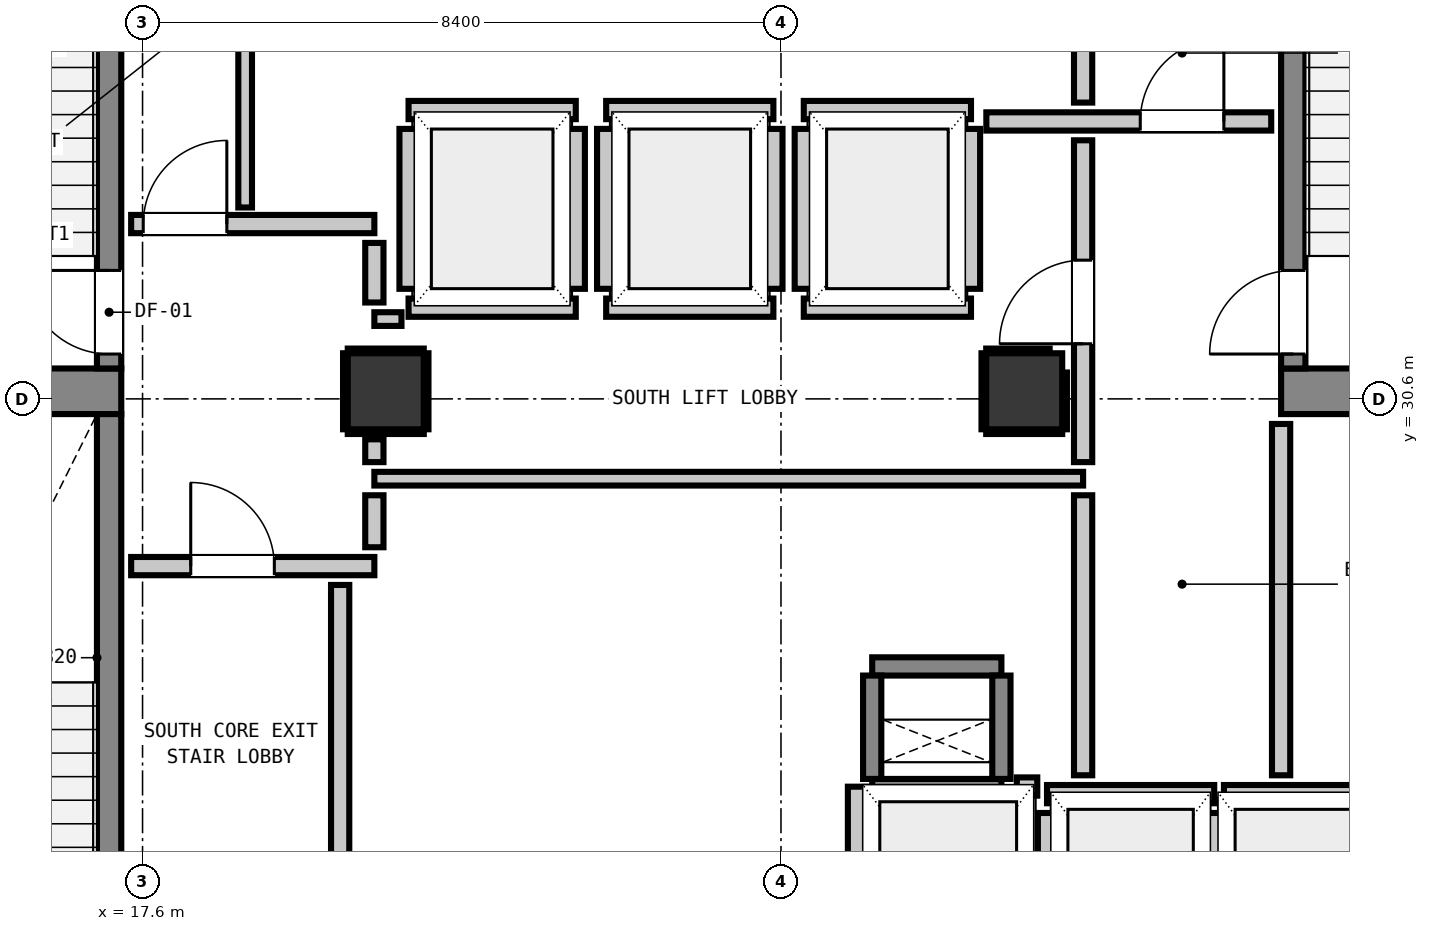
"""IFC4 building model, lengths in metres.
Left out: names, types, materials, properties, quantities, classifications, styles, units other than length and angle.
Written with IfcOpenShell. Run it as: python <this file> out.ifc"""

import sys

from ifc_helpers import new_model, si_unit, direction, frame, frame_2d, origin, origin_2d, place, context, subcontext, project, spatial, rectangle, extrude, element, fill, save


model = new_model("IFC4")
c1 = context("Model", 3, precision=1e-05, world=origin(), true_north=direction((0.0, 1.0)))
c2 = subcontext(c1, "Body", "Model", "MODEL_VIEW")
j1 = project(units=[si_unit("LENGTHUNIT", "METRE"), si_unit("PLANEANGLEUNIT", "RADIAN")], contexts=[c1])
p1 = place(None, origin())
s1 = spatial("IfcSite", under=j1, at=p1, CompositionType="ELEMENT")
p2 = place(p1, origin())
s2 = spatial("IfcBuilding", under=s1, at=p2, CompositionType="ELEMENT")
p3 = place(p2, frame((0.0, 0.0, 152.56)))
s3 = spatial("IfcBuildingStorey", under=s2, at=p3, CompositionType="ELEMENT", Elevation=152.56)
for number, where, z_axis, x_axis in (
    (1, (13.905, 30.7, 0.0), (0.0, 0.0, 1.0), (1.0, 0.0, 0.0)),
    (2, (32.58, 30.7, 0.0), (0.0, 0.0, 1.0), (1.0, 0.0, 0.0)),
):
    element("IfcWall", number, at=place(p3, frame(where, z_axis=z_axis, x_axis=x_axis)), inside=s3, PredefinedType="SHEAR", context=c2, shape_type="SweptSolid", body=[
        extrude(rectangle(XDim=3.415, YDim=0.6, at=frame_2d((1.708, 0.0))), origin(), (0.0, 0.0, 1.0), 3.32),
    ])
p4 = place(p3, frame((17.16, 31.0, 0.0), z_axis=(0.0, 0.0, 1.0), x_axis=(0.0, 1.0, 0.0)))
e3 = element("IfcWall", 3, at=p4, inside=s3, PredefinedType="SHEAR", context=c2, shape_type="SweptSolid", body=[
    extrude(rectangle(XDim=7.8, YDim=0.32, at=frame_2d((3.9, 0.0))), origin(), (0.0, 0.0, 1.0), 3.32),
])
p5 = place(p4, frame((0.19, 0.0, 0.0)))
e4 = element("IfcOpeningElement", 4, at=p5, cuts=e3, PredefinedType="OPENING", context=c2, shape_type="SweptSolid", body=[
    extrude(rectangle(XDim=1.1, YDim=2.15, at=frame_2d((0.55, 1.075))), frame((0.0, 0.17, 0.0), z_axis=(0.0, -1.0, 0.0), x_axis=(1.0, 0.0, 0.0)), (0.0, 0.0, 1.0), 0.34),
])
p6 = place(p3, frame((17.16, 22.5, 0.0), z_axis=(0.0, 0.0, 1.0), x_axis=(0.0, 1.0, 0.0)))
e5 = element("IfcWall", 5, at=p6, inside=s3, PredefinedType="SHEAR", context=c2, shape_type="SweptSolid", body=[
    extrude(rectangle(XDim=7.9, YDim=0.32, at=frame_2d((3.95, 0.0))), origin(), (0.0, 0.0, 1.0), 3.32),
])
p7 = place(p6, frame((0.29, 0.0, 0.0)))
e6 = element("IfcOpeningElement", 6, at=p7, cuts=e5, PredefinedType="OPENING", context=c2, shape_type="SweptSolid", body=[
    extrude(rectangle(XDim=1.1, YDim=2.15, at=frame_2d((0.55, 1.075))), frame((0.0, 0.17, 0.0), z_axis=(0.0, -1.0, 0.0), x_axis=(1.0, 0.0, 0.0)), (0.0, 0.0, 1.0), 0.34),
])
p8 = place(p3, frame((32.74, 31.0, 0.0), z_axis=(0.0, 0.0, 1.0), x_axis=(0.0, 1.0, 0.0)))
e7 = element("IfcWall", 7, at=p8, inside=s3, PredefinedType="SHEAR", context=c2, shape_type="SweptSolid", body=[
    extrude(rectangle(XDim=7.8, YDim=0.32, at=frame_2d((3.9, 0.0))), origin(), (0.0, 0.0, 1.0), 3.32),
])
p9 = place(p8, frame((0.19, 0.0, 0.0)))
e8 = element("IfcOpeningElement", 8, at=p9, cuts=e7, PredefinedType="OPENING", context=c2, shape_type="SweptSolid", body=[
    extrude(rectangle(XDim=1.1, YDim=2.15, at=frame_2d((0.55, 1.075))), frame((0.0, 0.17, 0.0), z_axis=(0.0, -1.0, 0.0), x_axis=(1.0, 0.0, 0.0)), (0.0, 0.0, 1.0), 0.34),
])
for number, where, z_axis, x_axis in (
    (9, (27.2, 25.48, 0.0), (0.0, 0.0, 1.0), (1.0, 0.0, 0.0)),
    (10, (27.2, 27.08, 0.0), (0.0, 0.0, 1.0), (1.0, 0.0, 0.0)),
):
    element("IfcWall", number, at=place(p3, frame(where, z_axis=z_axis, x_axis=x_axis)), inside=s3, PredefinedType="SHEAR", context=c2, shape_type="SweptSolid", body=[
        extrude(rectangle(XDim=1.7, YDim=0.24, at=frame_2d((0.85, 0.0))), origin(), (0.0, 0.0, 1.0), 3.32),
    ])
for number, where, z_axis, x_axis in (
    (11, (27.2, 25.6, 0.0), (0.0, 0.0, 1.0), (0.0, 1.0, 0.0)),
    (12, (28.9, 25.6, 0.0), (0.0, 0.0, 1.0), (0.0, 1.0, 0.0)),
):
    element("IfcWall", number, at=place(p3, frame(where, z_axis=z_axis, x_axis=x_axis)), inside=s3, PredefinedType="SHEAR", context=c2, shape_type="SweptSolid", body=[
        extrude(rectangle(XDim=1.36, YDim=0.24, at=frame_2d((0.68, 0.0))), origin(), (0.0, 0.0, 1.0), 3.32),
    ])
for number, where, z_axis, x_axis in (
    (13, (20.8, 30.7, 0.0), (0.0, 0.0, 1.0), (1.0, 0.0, 0.0)),
    (14, (29.2, 30.7, 0.0), (0.0, 0.0, 1.0), (1.0, 0.0, 0.0)),
):
    element("IfcColumn", number, at=place(p3, frame(where, z_axis=z_axis, x_axis=x_axis)), inside=s3, PredefinedType="COLUMN", context=c2, shape_type="SweptSolid", body=[
        extrude(rectangle(XDim=1.0, YDim=1.0, at=origin_2d()), origin(), (0.0, 0.0, 1.0), 3.32),
    ])
for number, where, z_axis, x_axis in (
    (15, (21.1, 31.8, 0.0), (0.0, 0.0, 1.0), (1.0, 0.0, 0.0)),
    (16, (21.1, 34.4, 0.0), (0.0, 0.0, 1.0), (1.0, 0.0, 0.0)),
):
    element("IfcWall", number, at=place(p3, frame(where, z_axis=z_axis, x_axis=x_axis)), inside=s3, PredefinedType="PARTITIONING", context=c2, shape_type="SweptSolid", body=[
        extrude(rectangle(XDim=2.2, YDim=0.24, at=frame_2d((1.1, 0.0))), origin(), (0.0, 0.0, 1.0), 3.08),
    ])
p10 = place(p3, frame((21.1, 32.048, 0.0), z_axis=(0.0, 0.0, 1.0), x_axis=(0.0, 1.0, 0.0)))
e17 = element("IfcWall", 17, at=p10, inside=s3, PredefinedType="PARTITIONING", context=c2, shape_type="SweptSolid", body=[
    extrude(rectangle(XDim=2.104, YDim=0.24, at=frame_2d((1.052, 0.0))), origin(), (0.0, 0.0, 1.0), 2.315),
])
p11 = place(p3, frame((23.3, 32.048, 0.0), z_axis=(0.0, 0.0, 1.0), x_axis=(0.0, 1.0, 0.0)))
e18 = element("IfcWall", 18, at=p11, inside=s3, PredefinedType="PARTITIONING", context=c2, shape_type="SweptSolid", body=[
    extrude(rectangle(XDim=2.104, YDim=0.24, at=frame_2d((1.052, 0.0))), origin(), (0.0, 0.0, 1.0), 3.08),
])
for number, where, z_axis, x_axis in (
    (19, (23.7, 31.8, 0.0), (0.0, 0.0, 1.0), (1.0, 0.0, 0.0)),
    (20, (23.7, 34.4, 0.0), (0.0, 0.0, 1.0), (1.0, 0.0, 0.0)),
):
    element("IfcWall", number, at=place(p3, frame(where, z_axis=z_axis, x_axis=x_axis)), inside=s3, PredefinedType="PARTITIONING", context=c2, shape_type="SweptSolid", body=[
        extrude(rectangle(XDim=2.2, YDim=0.24, at=frame_2d((1.1, 0.0))), origin(), (0.0, 0.0, 1.0), 3.08),
    ])
for number, where, z_axis, x_axis in (
    (21, (23.7, 32.048, 0.0), (0.0, 0.0, 1.0), (0.0, 1.0, 0.0)),
    (22, (25.9, 32.048, 0.0), (0.0, 0.0, 1.0), (0.0, 1.0, 0.0)),
):
    element("IfcWall", number, at=place(p3, frame(where, z_axis=z_axis, x_axis=x_axis)), inside=s3, PredefinedType="PARTITIONING", context=c2, shape_type="SweptSolid", body=[
        extrude(rectangle(XDim=2.104, YDim=0.24, at=frame_2d((1.052, 0.0))), origin(), (0.0, 0.0, 1.0), 3.08),
    ])
for number, where, z_axis, x_axis in (
    (23, (26.3, 31.8, 0.0), (0.0, 0.0, 1.0), (1.0, 0.0, 0.0)),
    (24, (26.3, 34.4, 0.0), (0.0, 0.0, 1.0), (1.0, 0.0, 0.0)),
):
    element("IfcWall", number, at=place(p3, frame(where, z_axis=z_axis, x_axis=x_axis)), inside=s3, PredefinedType="PARTITIONING", context=c2, shape_type="SweptSolid", body=[
        extrude(rectangle(XDim=2.2, YDim=0.24, at=frame_2d((1.1, 0.0))), origin(), (0.0, 0.0, 1.0), 3.08),
    ])
for number, where, z_axis, x_axis in (
    (25, (26.3, 32.048, 0.0), (0.0, 0.0, 1.0), (0.0, 1.0, 0.0)),
    (26, (28.5, 32.048, 0.0), (0.0, 0.0, 1.0), (0.0, 1.0, 0.0)),
):
    element("IfcWall", number, at=place(p3, frame(where, z_axis=z_axis, x_axis=x_axis)), inside=s3, PredefinedType="PARTITIONING", context=c2, shape_type="SweptSolid", body=[
        extrude(rectangle(XDim=2.104, YDim=0.24, at=frame_2d((1.052, 0.0))), origin(), (0.0, 0.0, 1.0), 3.08),
    ])
p12 = place(p3, frame((29.5, 25.4, 0.0), z_axis=(0.0, 0.0, 1.0), x_axis=(1.0, 0.0, 0.0)))
e27 = element("IfcWall", 27, at=p12, inside=s3, PredefinedType="PARTITIONING", context=c2, shape_type="SweptSolid", body=[
    extrude(rectangle(XDim=2.2, YDim=0.24, at=frame_2d((1.1, 0.0))), origin(), (0.0, 0.0, 1.0), 3.08),
])
p13 = place(p3, frame((29.5, 22.632, 0.0), z_axis=(0.0, 0.0, 1.0), x_axis=(0.0, 1.0, 0.0)))
e28 = element("IfcWall", 28, at=p13, inside=s3, PredefinedType="PARTITIONING", context=c2, shape_type="SweptSolid", body=[
    extrude(rectangle(XDim=2.52, YDim=0.24, at=frame_2d((1.26, 0.0))), origin(), (0.0, 0.0, 1.0), 2.315),
])
p14 = place(p3, frame((31.7, 22.63, 0.0), z_axis=(0.0, 0.0, 1.0), x_axis=(0.0, 1.0, 0.0)))
e29 = element("IfcWall", 29, at=p14, inside=s3, PredefinedType="PARTITIONING", context=c2, shape_type="SweptSolid", body=[
    extrude(rectangle(XDim=2.522, YDim=0.24, at=frame_2d((1.261, 0.0))), origin(), (0.0, 0.0, 1.0), 3.08),
])
p15 = place(p3, frame((31.828, 25.4, 0.0), z_axis=(0.0, 0.0, 1.0), x_axis=(1.0, 0.0, 0.0)))
e30 = element("IfcWall", 30, at=p15, inside=s3, PredefinedType="PARTITIONING", context=c2, shape_type="SweptSolid", body=[
    extrude(rectangle(XDim=2.072, YDim=0.24, at=frame_2d((1.036, 0.0))), origin(), (0.0, 0.0, 1.0), 3.08),
])
p16 = place(p3, frame((29.103, 25.5, 0.0), z_axis=(0.0, 0.0, 1.0), x_axis=(1.0, 0.0, 0.0)))
e31 = element("IfcWall", 31, at=p16, inside=s3, PredefinedType="PARTITIONING", context=c2, shape_type="SweptSolid", body=[
    extrude(rectangle(XDim=0.269, YDim=0.24, at=frame_2d((0.135, 0.0))), origin(), (0.0, 0.0, 1.0), 3.08),
])
p17 = place(p3, frame((27.0, 22.63, 0.0), z_axis=(0.0, 0.0, 1.0), x_axis=(0.0, 1.0, 0.0)))
e32 = element("IfcWall", 32, at=p17, inside=s3, PredefinedType="PARTITIONING", context=c2, shape_type="SweptSolid", body=[
    extrude(rectangle(XDim=2.868, YDim=0.24, at=frame_2d((1.434, 0.0))), origin(), (0.0, 0.0, 1.0), 3.08),
])
p18 = place(p3, frame((17.45, 28.4, 0.0), z_axis=(0.0, 0.0, 1.0), x_axis=(1.0, 0.0, 0.0)))
e33 = element("IfcWall", 33, at=p18, inside=s3, PredefinedType="PARTITIONING", context=c2, shape_type="SweptSolid", body=[
    extrude(rectangle(XDim=3.2, YDim=0.24, at=frame_2d((1.6, 0.0))), origin(), (0.0, 0.0, 1.0), 3.08),
])
p19 = place(p18, frame((0.784, 0.0, 0.0)))
e34 = element("IfcOpeningElement", 34, at=p19, cuts=e33, PredefinedType="OPENING", context=c2, shape_type="SweptSolid", body=[
    extrude(rectangle(XDim=1.1, YDim=2.15, at=frame_2d((0.55, 1.075))), frame((0.0, 0.13, 0.0), z_axis=(0.0, -1.0, 0.0), x_axis=(1.0, 0.0, 0.0)), (0.0, 0.0, 1.0), 0.26),
])
p20 = place(p3, frame((17.45, 32.9, 0.0), z_axis=(0.0, 0.0, 1.0), x_axis=(1.0, 0.0, 0.0)))
e35 = element("IfcWall", 35, at=p20, inside=s3, PredefinedType="PARTITIONING", context=c2, shape_type="SweptSolid", body=[
    extrude(rectangle(XDim=3.2, YDim=0.24, at=frame_2d((1.6, 0.0))), origin(), (0.0, 0.0, 1.0), 3.08),
])
p21 = place(p20, frame((0.159, 0.0, 0.0)))
e36 = element("IfcOpeningElement", 36, at=p21, cuts=e35, PredefinedType="OPENING", context=c2, shape_type="SweptSolid", body=[
    extrude(rectangle(XDim=1.1, YDim=2.15, at=frame_2d((0.55, 1.075))), frame((0.0, 0.13, 0.0), z_axis=(0.0, -1.0, 0.0), x_axis=(1.0, 0.0, 0.0)), (0.0, 0.0, 1.0), 0.26),
])
p22 = place(p3, frame((28.702, 34.25, 0.0), z_axis=(0.0, 0.0, 1.0), x_axis=(1.0, 0.0, 0.0)))
e37 = element("IfcWall", 37, at=p22, inside=s3, PredefinedType="PARTITIONING", context=c2, shape_type="SweptSolid", body=[
    extrude(rectangle(XDim=3.748, YDim=0.24, at=frame_2d((1.874, 0.0))), origin(), (0.0, 0.0, 1.0), 3.08),
])
p23 = place(p22, frame((2.025, 0.0, 0.0)))
e38 = element("IfcOpeningElement", 38, at=p23, cuts=e37, PredefinedType="OPENING", context=c2, shape_type="SweptSolid", body=[
    extrude(rectangle(XDim=1.1, YDim=2.15, at=frame_2d((0.55, 1.075))), frame((0.0, 0.13, 0.0), z_axis=(0.0, -1.0, 0.0), x_axis=(1.0, 0.0, 0.0)), (0.0, 0.0, 1.0), 0.26),
])
p24 = place(p3, frame((20.65, 29.55, 0.0), z_axis=(0.0, 0.0, 1.0), x_axis=(1.0, 0.0, 0.0)))
e39 = element("IfcWall", 39, at=p24, inside=s3, PredefinedType="PARTITIONING", context=c2, shape_type="SweptSolid", body=[
    extrude(rectangle(XDim=9.325, YDim=0.18, at=frame_2d((4.663, 0.0))), origin(), (0.0, 0.0, 1.0), 3.08),
])
p25 = place(p3, frame((20.65, 31.65, 0.0), z_axis=(0.0, 0.0, 1.0), x_axis=(1.0, 0.0, 0.0)))
e40 = element("IfcWall", 40, at=p25, inside=s3, PredefinedType="PARTITIONING", context=c2, shape_type="SweptSolid", body=[
    extrude(rectangle(XDim=0.357, YDim=0.18, at=frame_2d((0.179, 0.0))), origin(), (0.0, 0.0, 1.0), 3.08),
])
p26 = place(p3, frame((20.2, 22.586, 0.0), z_axis=(0.0, 0.0, 1.0), x_axis=(0.0, 1.0, 0.0)))
e41 = element("IfcWall", 41, at=p26, inside=s3, PredefinedType="PARTITIONING", context=c2, shape_type="SweptSolid", body=[
    extrude(rectangle(XDim=5.566, YDim=0.24, at=frame_2d((2.783, 0.0))), origin(), (0.0, 0.0, 1.0), 3.08),
])
p27 = place(p3, frame((20.65, 28.648, 0.0), z_axis=(0.0, 0.0, 1.0), x_axis=(0.0, 1.0, 0.0)))
e42 = element("IfcWall", 42, at=p27, inside=s3, PredefinedType="PARTITIONING", context=c2, shape_type="SweptSolid", body=[
    extrude(rectangle(XDim=0.684, YDim=0.24, at=frame_2d((0.342, 0.0))), origin(), (0.0, 0.0, 1.0), 2.315),
])
p28 = place(p3, frame((20.65, 29.768, 0.0), z_axis=(0.0, 0.0, 1.0), x_axis=(0.0, 1.0, 0.0)))
e43 = element("IfcWall", 43, at=p28, inside=s3, PredefinedType="PARTITIONING", context=c2, shape_type="SweptSolid", body=[
    extrude(rectangle(XDim=0.3, YDim=0.24, at=frame_2d((0.15, 0.0))), origin(), (0.0, 0.0, 1.0), 2.315),
])
p29 = place(p3, frame((20.65, 31.868, 0.0), z_axis=(0.0, 0.0, 1.0), x_axis=(0.0, 1.0, 0.0)))
e44 = element("IfcWall", 44, at=p29, inside=s3, PredefinedType="PARTITIONING", context=c2, shape_type="SweptSolid", body=[
    extrude(rectangle(XDim=0.784, YDim=0.24, at=frame_2d((0.392, 0.0))), origin(), (0.0, 0.0, 1.0), 2.315),
])
p30 = place(p3, frame((29.975, 25.648, 0.0), z_axis=(0.0, 0.0, 1.0), x_axis=(0.0, 1.0, 0.0)))
e45 = element("IfcWall", 45, at=p30, inside=s3, PredefinedType="PARTITIONING", context=c2, shape_type="SweptSolid", body=[
    extrude(rectangle(XDim=3.684, YDim=0.24, at=frame_2d((1.842, 0.0))), origin(), (0.0, 0.0, 1.0), 3.08),
])
p31 = place(p3, frame((29.975, 29.768, 0.0), z_axis=(0.0, 0.0, 1.0), x_axis=(0.0, 1.0, 0.0)))
e46 = element("IfcWall", 46, at=p31, inside=s3, PredefinedType="PARTITIONING", context=c2, shape_type="SweptSolid", body=[
    extrude(rectangle(XDim=4.234, YDim=0.24, at=frame_2d((2.117, 0.0))), origin(), (0.0, 0.0, 1.0), 3.08),
])
p32 = place(p31, frame((1.557, 0.0, 0.0)))
e47 = element("IfcOpeningElement", 47, at=p32, cuts=e46, PredefinedType="OPENING", context=c2, shape_type="SweptSolid", body=[
    extrude(rectangle(XDim=1.1, YDim=2.15, at=frame_2d((0.55, 1.075))), frame((0.0, 0.13, 0.0), z_axis=(0.0, -1.0, 0.0), x_axis=(1.0, 0.0, 0.0)), (0.0, 0.0, 1.0), 0.26),
])
p33 = place(p3, frame((29.975, 34.498, 0.0), z_axis=(0.0, 0.0, 1.0), x_axis=(0.0, 1.0, 0.0)))
e48 = element("IfcWall", 48, at=p33, inside=s3, PredefinedType="PARTITIONING", context=c2, shape_type="SweptSolid", body=[
    extrude(rectangle(XDim=0.964, YDim=0.24, at=frame_2d((0.482, 0.0))), origin(), (0.0, 0.0, 1.0), 3.08),
])
p34 = place(p3, frame((32.58, 25.648, 0.0), z_axis=(0.0, 0.0, 1.0), x_axis=(0.0, 1.0, 0.0)))
e49 = element("IfcWall", 49, at=p34, inside=s3, PredefinedType="PARTITIONING", context=c2, shape_type="SweptSolid", body=[
    extrude(rectangle(XDim=4.622, YDim=0.24, at=frame_2d((2.311, 0.0))), origin(), (0.0, 0.0, 1.0), 3.08),
])
p35 = place(p3, frame((18.95, 33.118, 0.0), z_axis=(0.0, 0.0, 1.0), x_axis=(0.0, 1.0, 0.0)))
e50 = element("IfcWall", 50, at=p35, inside=s3, PredefinedType="PARTITIONING", context=c2, shape_type="SweptSolid", body=[
    extrude(rectangle(XDim=2.374, YDim=0.18, at=frame_2d((1.187, 0.0))), origin(), (0.0, 0.0, 1.0), 3.08),
])
for number, where, z_axis, x_axis in (
    (51, (20.3, 30.168, 0.0), (0.0, 0.0, 1.0), (1.0, 0.0, 0.0)),
    (52, (20.3, 31.232, 0.0), (0.0, 0.0, 1.0), (1.0, 0.0, 0.0)),
    (53, (20.268, 30.2, 0.0), (0.0, 0.0, 1.0), (0.0, 1.0, 0.0)),
    (54, (21.332, 30.2, 0.0), (0.0, 0.0, 1.0), (0.0, 1.0, 0.0)),
    (55, (28.7, 30.168, 0.0), (0.0, 0.0, 1.0), (1.0, 0.0, 0.0)),
):
    element("IfcWall", number, at=place(p3, frame(where, z_axis=z_axis, x_axis=x_axis)), inside=s3, PredefinedType="PARTITIONING", context=c2, shape_type="SweptSolid", body=[
        extrude(rectangle(XDim=1.0, YDim=0.06, at=frame_2d((0.5, 0.0))), origin(), (0.0, 0.0, 1.0), 1.45),
    ])
p36 = place(p3, frame((28.7, 31.232, 0.0), z_axis=(0.0, 0.0, 1.0), x_axis=(1.0, 0.0, 0.0)))
e56 = element("IfcWall", 56, at=p36, inside=s3, PredefinedType="PARTITIONING", context=c2, shape_type="SweptSolid", body=[
    extrude(rectangle(XDim=0.835, YDim=0.06, at=frame_2d((0.417, 0.0))), origin(), (0.0, 0.0, 1.0), 1.45),
])
p37 = place(p3, frame((28.668, 30.2, 0.0), z_axis=(0.0, 0.0, 1.0), x_axis=(0.0, 1.0, 0.0)))
e57 = element("IfcWall", 57, at=p37, inside=s3, PredefinedType="PARTITIONING", context=c2, shape_type="SweptSolid", body=[
    extrude(rectangle(XDim=1.0, YDim=0.06, at=frame_2d((0.5, 0.0))), origin(), (0.0, 0.0, 1.0), 1.45),
])
p38 = place(p3, frame((29.732, 30.2, 0.0), z_axis=(0.0, 0.0, 1.0), x_axis=(0.0, 1.0, 0.0)))
e58 = element("IfcWall", 58, at=p38, inside=s3, PredefinedType="PARTITIONING", context=c2, shape_type="SweptSolid", body=[
    extrude(rectangle(XDim=0.747, YDim=0.06, at=frame_2d((0.374, 0.0))), origin(), (0.0, 0.0, 1.0), 1.45),
])
p39 = place(p5, origin())
e59 = element("IfcDoor", 59, at=p39, inside=s3, OperationType="SINGLE_SWING_RIGHT", PredefinedType="DOOR", context=c2, shape_type="SweptSolid", body=[
    extrude(rectangle(XDim=1.1, YDim=2.15, at=frame_2d((0.55, 1.075))), frame((0.0, 0.025, 0.0), z_axis=(0.0, -1.0, 0.0), x_axis=(1.0, 0.0, 0.0)), (0.0, 0.0, 1.0), 0.05),
])
fill(e4, e59)
p40 = place(p9, origin())
e60 = element("IfcDoor", 60, at=p40, inside=s3, OperationType="SINGLE_SWING_LEFT", PredefinedType="DOOR", context=c2, shape_type="SweptSolid", body=[
    extrude(rectangle(XDim=1.1, YDim=2.15, at=frame_2d((0.55, 1.075))), frame((0.0, 0.025, 0.0), z_axis=(0.0, -1.0, 0.0), x_axis=(1.0, 0.0, 0.0)), (0.0, 0.0, 1.0), 0.05),
])
fill(e8, e60)
p41 = place(p19, origin())
e61 = element("IfcDoor", 61, at=p41, inside=s3, OperationType="SINGLE_SWING_LEFT", PredefinedType="DOOR", context=c2, shape_type="SweptSolid", body=[
    extrude(rectangle(XDim=1.1, YDim=2.15, at=frame_2d((0.55, 1.075))), frame((0.0, 0.025, 0.0), z_axis=(0.0, -1.0, 0.0), x_axis=(1.0, 0.0, 0.0)), (0.0, 0.0, 1.0), 0.05),
])
fill(e34, e61)
p42 = place(p21, origin())
e62 = element("IfcDoor", 62, at=p42, inside=s3, OperationType="SINGLE_SWING_RIGHT", PredefinedType="DOOR", context=c2, shape_type="SweptSolid", body=[
    extrude(rectangle(XDim=1.1, YDim=2.15, at=frame_2d((0.55, 1.075))), frame((0.0, 0.025, 0.0), z_axis=(0.0, -1.0, 0.0), x_axis=(1.0, 0.0, 0.0)), (0.0, 0.0, 1.0), 0.05),
])
fill(e36, e62)
p43 = place(p32, origin())
e63 = element("IfcDoor", 63, at=p43, inside=s3, OperationType="SINGLE_SWING_LEFT", PredefinedType="DOOR", context=c2, shape_type="SweptSolid", body=[
    extrude(rectangle(XDim=1.1, YDim=2.15, at=frame_2d((0.55, 1.075))), frame((0.0, 0.025, 0.0), z_axis=(0.0, -1.0, 0.0), x_axis=(1.0, 0.0, 0.0)), (0.0, 0.0, 1.0), 0.05),
])
fill(e47, e63)
p44 = place(p23, origin())
e64 = element("IfcDoor", 64, at=p44, inside=s3, OperationType="SINGLE_SWING_RIGHT", PredefinedType="DOOR", context=c2, shape_type="SweptSolid", body=[
    extrude(rectangle(XDim=1.1, YDim=2.15, at=frame_2d((0.55, 1.075))), frame((0.0, 0.025, 0.0), z_axis=(0.0, -1.0, 0.0), x_axis=(1.0, 0.0, 0.0)), (0.0, 0.0, 1.0), 0.05),
])
fill(e38, e64)
save(model, sys.argv[1])
